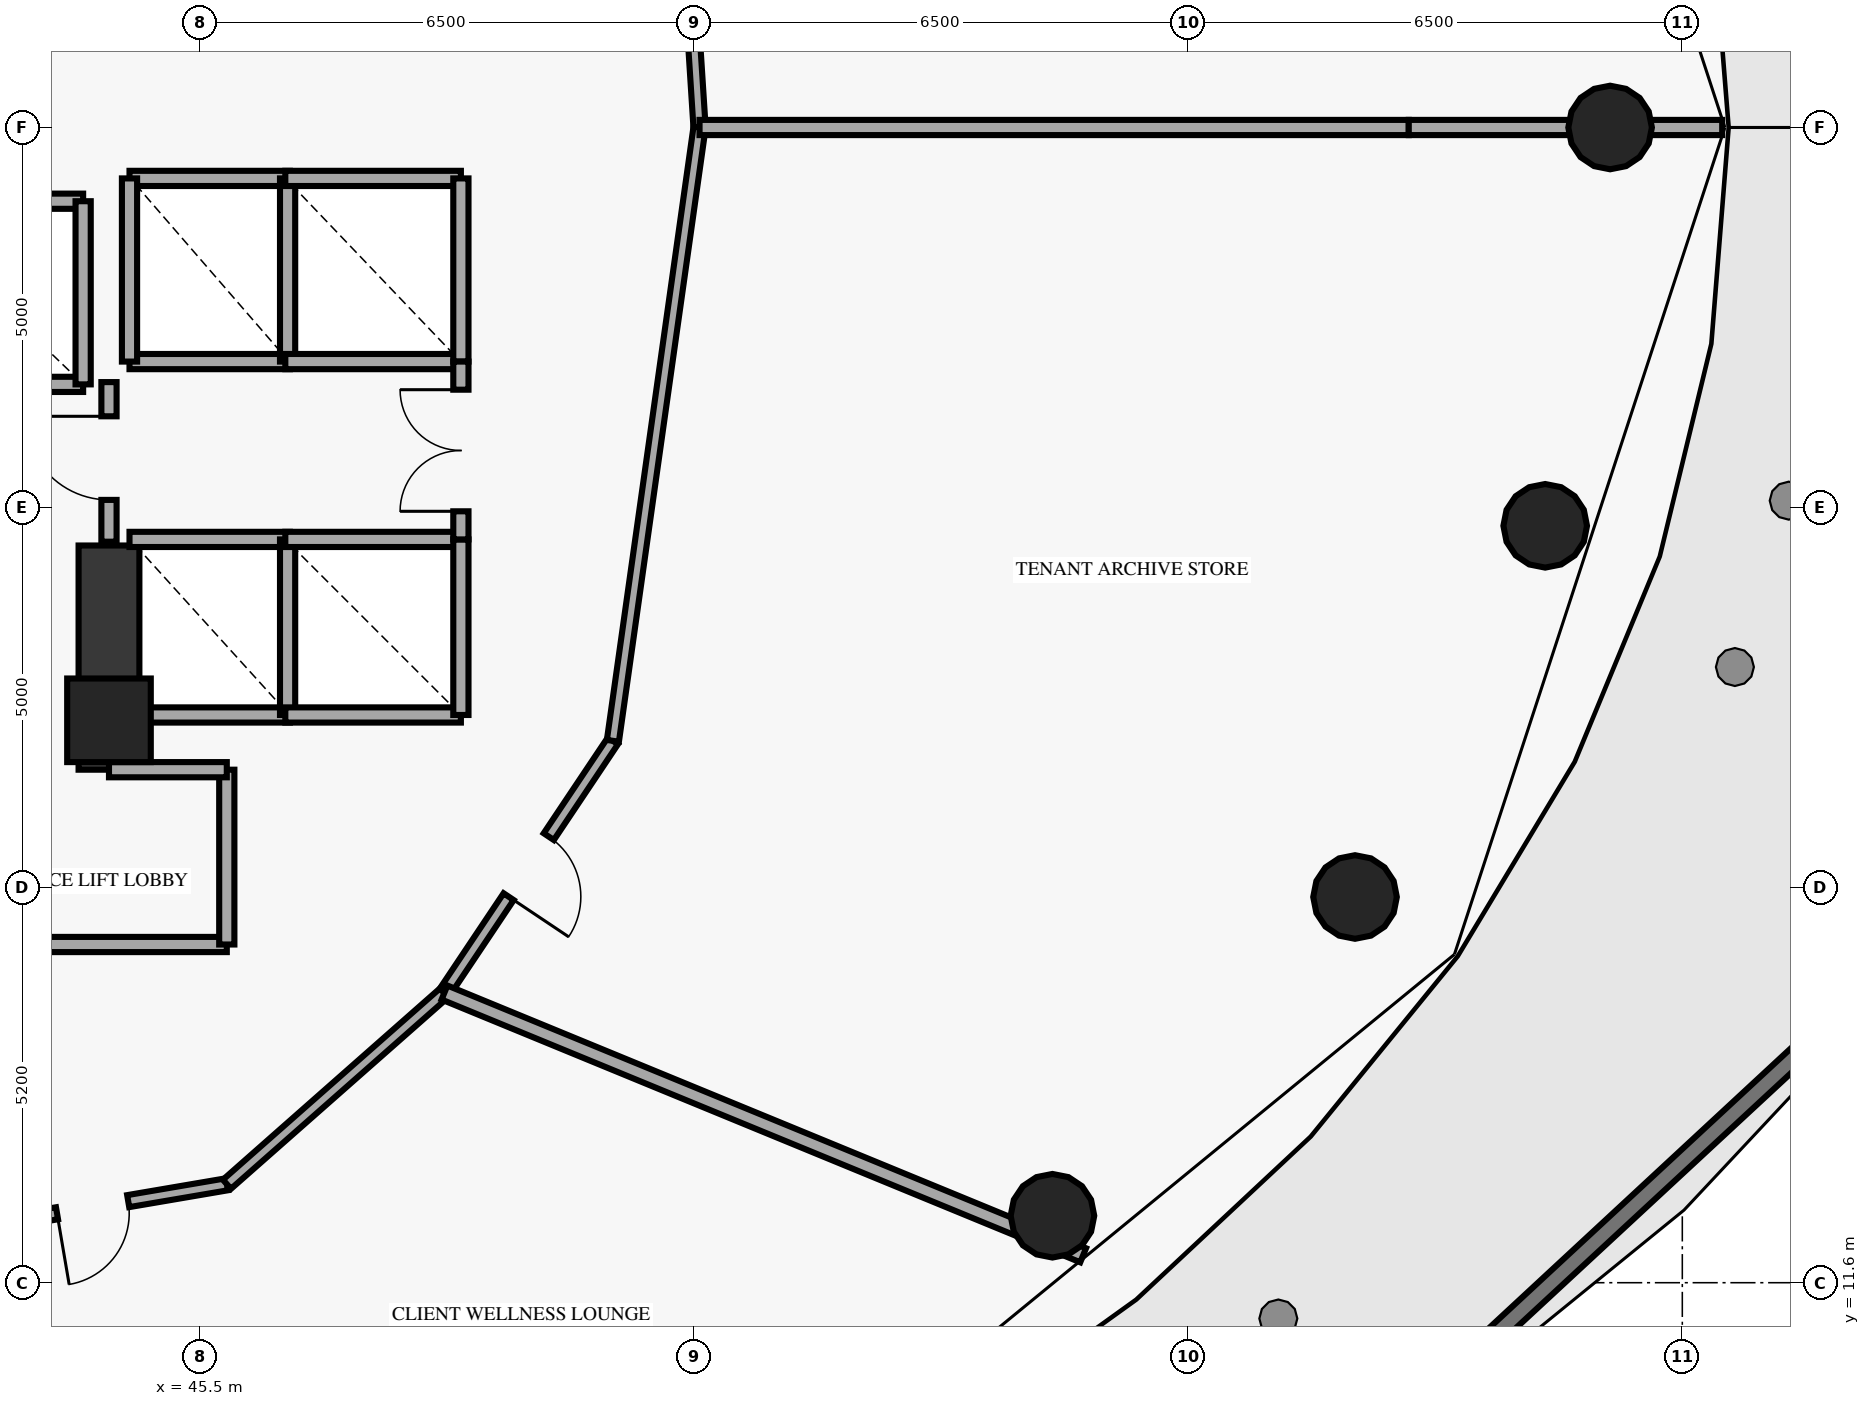
"""IFC4 building model, lengths in metres.
Left out: names, types, materials, properties, quantities, classifications, styles, units other than length and angle.
Written with IfcOpenShell. Run it as: python <this file> out.ifc"""

import sys

from ifc_helpers import new_model, si_unit, direction, frame, frame_2d, origin, origin_2d, place, context, subcontext, project, spatial, rectangle, circle, extrude, element, fill, save


model = new_model("IFC4")
c1 = context("Model", 3, precision=1e-05, world=origin(), true_north=direction((0.0, 1.0)))
c2 = subcontext(c1, "Body", "Model", "MODEL_VIEW")
j1 = project(units=[si_unit("LENGTHUNIT", "METRE"), si_unit("PLANEANGLEUNIT", "RADIAN")], contexts=[c1])
p1 = place(None, origin())
s1 = spatial("IfcSite", under=j1, at=p1, CompositionType="ELEMENT")
p2 = place(p1, origin())
s2 = spatial("IfcBuilding", under=s1, at=p2, CompositionType="ELEMENT")
p3 = place(p2, frame((0.0, 0.0, 21.0)))
s3 = spatial("IfcBuildingStorey", under=s2, at=p3, CompositionType="ELEMENT", Elevation=21.0)
p4 = place(p3, frame((44.3, 19.0, 0.0), z_axis=(0.0, 0.0, 1.0), x_axis=(1.0, 0.0, 0.0)))
e1 = element("IfcColumn", 1, at=p4, inside=s3, PredefinedType="PILASTER", context=c2, shape_type="SweptSolid", body=[
    extrude(rectangle(XDim=1.1, YDim=1.1, at=origin_2d()), origin(), (0.0, 0.0, 1.0), 3.79),
])
for number, where, z_axis, x_axis in (
    (2, (64.05, 26.8, 0.0), (0.0, 0.0, 1.0), (1.0, 0.0, 0.0)),
    (3, (56.713, 12.481, 0.0), (0.0, 0.0, 1.0), (1.0, 0.0, 0.0)),
):
    element("IfcColumn", number, at=place(p3, frame(where, z_axis=z_axis, x_axis=x_axis)), inside=s3, PredefinedType="COLUMN", context=c2, shape_type="SweptSolid", body=[
        extrude(circle(Radius=0.55, at=origin_2d()), origin(), (0.0, 0.0, 1.0), 3.79),
    ])
for number, where, z_axis, x_axis in (
    (4, (60.694, 16.675, -0.26), (0.0, 0.0, 1.0), (1.0, 0.0, 0.0)),
    (5, (63.196, 21.559, -0.26), (0.0, 0.0, 1.0), (1.0, 0.0, 0.0)),
):
    element("IfcColumn", number, at=place(p3, frame(where, z_axis=z_axis, x_axis=x_axis)), inside=s3, PredefinedType="COLUMN", context=c2, shape_type="SweptSolid", body=[
        extrude(circle(Radius=0.55, at=origin_2d()), origin(), (0.0, 0.0, 1.0), 4.05),
    ])
p5 = place(p3, frame((44.3, 18.35, 0.0), z_axis=(0.0, 0.0, 1.0), x_axis=(0.0, 1.0, 0.0)))
e6 = element("IfcWall", 6, at=p5, inside=s3, PredefinedType="SHEAR", context=c2, shape_type="SweptSolid", body=[
    extrude(rectangle(XDim=2.95, YDim=0.8, at=frame_2d((1.475, 0.0))), origin(), (0.0, 0.0, 1.0), 3.79),
])
p6 = place(p3, frame((62.016, 10.43, 0.0), z_axis=(0.0, 0.0, 1.0), x_axis=(0.733372632091, 0.679826876859, 0.0)))
e7 = element("IfcWall", 7, at=p6, inside=s3, PredefinedType="PARAPET", context=c2, shape_type="SweptSolid", body=[
    extrude(rectangle(XDim=7.053, YDim=0.24, at=frame_2d((3.527, 0.0))), origin(), (0.0, 0.0, 1.0), 1.15),
])
for number, where, z_axis, x_axis in (
    (8, (44.57, 23.72, 0.0), (0.0, 0.0, 1.0), (1.0, 0.0, 0.0)),
    (9, (44.57, 26.13, 0.0), (0.0, 0.0, 1.0), (1.0, 0.0, 0.0)),
):
    element("IfcWall", number, at=place(p3, frame(where, z_axis=z_axis, x_axis=x_axis)), inside=s3, PredefinedType="SOLIDWALL", context=c2, shape_type="SweptSolid", body=[
        extrude(rectangle(XDim=2.11, YDim=0.2, at=frame_2d((1.055, 0.0))), origin(), (0.0, 0.0, 1.0), 3.79),
    ])
for number, where, z_axis, x_axis in (
    (10, (44.57, 23.72, 0.0), (0.0, 0.0, 1.0), (0.0, 1.0, 0.0)),
    (11, (46.65, 23.72, 0.0), (0.0, 0.0, 1.0), (0.0, 1.0, 0.0)),
):
    element("IfcWall", number, at=place(p3, frame(where, z_axis=z_axis, x_axis=x_axis)), inside=s3, PredefinedType="SOLIDWALL", context=c2, shape_type="SweptSolid", body=[
        extrude(rectangle(XDim=2.41, YDim=0.2, at=frame_2d((1.205, 0.0))), origin(), (0.0, 0.0, 1.0), 3.79),
    ])
for number, where, z_axis, x_axis in (
    (12, (46.62, 23.72, 0.0), (0.0, 0.0, 1.0), (1.0, 0.0, 0.0)),
    (13, (46.62, 26.13, 0.0), (0.0, 0.0, 1.0), (1.0, 0.0, 0.0)),
):
    element("IfcWall", number, at=place(p3, frame(where, z_axis=z_axis, x_axis=x_axis)), inside=s3, PredefinedType="SOLIDWALL", context=c2, shape_type="SweptSolid", body=[
        extrude(rectangle(XDim=2.31, YDim=0.2, at=frame_2d((1.155, 0.0))), origin(), (0.0, 0.0, 1.0), 3.79),
    ])
p7 = place(p3, frame((48.93, 23.72, 0.0), z_axis=(0.0, 0.0, 1.0), x_axis=(0.0, 1.0, 0.0)))
e14 = element("IfcWall", 14, at=p7, inside=s3, PredefinedType="SOLIDWALL", context=c2, shape_type="SweptSolid", body=[
    extrude(rectangle(XDim=2.41, YDim=0.2, at=frame_2d((1.205, 0.0))), origin(), (0.0, 0.0, 1.0), 3.79),
])
for number, where, z_axis, x_axis in (
    (15, (44.57, 19.07, 0.0), (0.0, 0.0, 1.0), (1.0, 0.0, 0.0)),
    (16, (44.57, 21.38, 0.0), (0.0, 0.0, 1.0), (1.0, 0.0, 0.0)),
):
    element("IfcWall", number, at=place(p3, frame(where, z_axis=z_axis, x_axis=x_axis)), inside=s3, PredefinedType="SOLIDWALL", context=c2, shape_type="SweptSolid", body=[
        extrude(rectangle(XDim=2.11, YDim=0.2, at=frame_2d((1.055, 0.0))), origin(), (0.0, 0.0, 1.0), 3.79),
    ])
for number, where, z_axis, x_axis in (
    (17, (46.65, 19.07, 0.0), (0.0, 0.0, 1.0), (0.0, 1.0, 0.0)),
    (18, (46.62, 19.07, 0.0), (0.0, 0.0, 1.0), (1.0, 0.0, 0.0)),
    (19, (46.62, 21.38, 0.0), (0.0, 0.0, 1.0), (1.0, 0.0, 0.0)),
    (20, (48.93, 19.07, 0.0), (0.0, 0.0, 1.0), (0.0, 1.0, 0.0)),
):
    element("IfcWall", number, at=place(p3, frame(where, z_axis=z_axis, x_axis=x_axis)), inside=s3, PredefinedType="SOLIDWALL", context=c2, shape_type="SweptSolid", body=[
        extrude(rectangle(XDim=2.31, YDim=0.2, at=frame_2d((1.155, 0.0))), origin(), (0.0, 0.0, 1.0), 3.79),
    ])
for number, where, z_axis, x_axis in (
    (21, (41.46, 23.42, 0.0), (0.0, 0.0, 1.0), (1.0, 0.0, 0.0)),
    (22, (41.46, 25.83, 0.0), (0.0, 0.0, 1.0), (1.0, 0.0, 0.0)),
):
    element("IfcWall", number, at=place(p3, frame(where, z_axis=z_axis, x_axis=x_axis)), inside=s3, PredefinedType="SOLIDWALL", context=c2, shape_type="SweptSolid", body=[
        extrude(rectangle(XDim=2.5, YDim=0.2, at=frame_2d((1.25, 0.0))), origin(), (0.0, 0.0, 1.0), 3.79),
    ])
p8 = place(p3, frame((43.96, 23.42, 0.0), z_axis=(0.0, 0.0, 1.0), x_axis=(0.0, 1.0, 0.0)))
e23 = element("IfcWall", 23, at=p8, inside=s3, PredefinedType="SOLIDWALL", context=c2, shape_type="SweptSolid", body=[
    extrude(rectangle(XDim=2.41, YDim=0.2, at=frame_2d((1.205, 0.0))), origin(), (0.0, 0.0, 1.0), 3.79),
])
p9 = place(p3, frame((48.93, 21.38, 0.0), z_axis=(0.0, 0.0, 1.0), x_axis=(0.0, 1.0, 0.0)))
e24 = element("IfcWall", 24, at=p9, inside=s3, PredefinedType="SOLIDWALL", context=c2, shape_type="SweptSolid", body=[
    extrude(rectangle(XDim=2.34, YDim=0.2, at=frame_2d((1.17, 0.0))), origin(), (0.0, 0.0, 1.0), 3.79),
])
p10 = place(p9, frame((0.37, 0.0, 0.0)))
e25 = element("IfcOpeningElement", 25, at=p10, cuts=e24, PredefinedType="OPENING", context=c2, shape_type="SweptSolid", body=[
    extrude(rectangle(XDim=1.6, YDim=2.2, at=frame_2d((0.8, 1.1))), frame((0.0, 0.11, 0.0), z_axis=(0.0, -1.0, 0.0), x_axis=(1.0, 0.0, 0.0)), (0.0, 0.0, 1.0), 0.22),
])
p11 = place(p3, frame((44.3, 21.35, 0.0), z_axis=(0.0, 0.0, 1.0), x_axis=(0.0, 1.0, 0.0)))
e26 = element("IfcWall", 26, at=p11, inside=s3, PredefinedType="SOLIDWALL", context=c2, shape_type="SweptSolid", body=[
    extrude(rectangle(XDim=2.1, YDim=0.2, at=frame_2d((1.05, 0.0))), origin(), (0.0, 0.0, 1.0), 3.01),
])
p12 = place(p11, frame((0.55, 0.0, 0.0)))
e27 = element("IfcOpeningElement", 27, at=p12, cuts=e26, PredefinedType="OPENING", context=c2, shape_type="SweptSolid", body=[
    extrude(rectangle(XDim=1.1, YDim=2.15, at=frame_2d((0.55, 1.075))), frame((0.0, 0.11, 0.0), z_axis=(0.0, -1.0, 0.0), x_axis=(1.0, 0.0, 0.0)), (0.0, 0.0, 1.0), 0.22),
])
p13 = place(p3, frame((41.35, 16.05, 0.0), z_axis=(0.0, 0.0, 1.0), x_axis=(1.0, 0.0, 0.0)))
e28 = element("IfcWall", 28, at=p13, inside=s3, PredefinedType="SOLIDWALL", context=c2, shape_type="SweptSolid", body=[
    extrude(rectangle(XDim=4.5, YDim=0.2, at=frame_2d((2.25, 0.0))), origin(), (0.0, 0.0, 1.0), 3.79),
])
p14 = place(p3, frame((45.85, 16.05, 0.0), z_axis=(0.0, 0.0, 1.0), x_axis=(0.0, 1.0, 0.0)))
e29 = element("IfcWall", 29, at=p14, inside=s3, PredefinedType="SOLIDWALL", context=c2, shape_type="SweptSolid", body=[
    extrude(rectangle(XDim=2.3, YDim=0.2, at=frame_2d((1.15, 0.0))), origin(), (0.0, 0.0, 1.0), 3.79),
])
p15 = place(p3, frame((44.3, 18.35, 0.0), z_axis=(0.0, 0.0, 1.0), x_axis=(1.0, 0.0, 0.0)))
e30 = element("IfcWall", 30, at=p15, inside=s3, PredefinedType="SOLIDWALL", context=c2, shape_type="SweptSolid", body=[
    extrude(rectangle(XDim=1.55, YDim=0.2, at=frame_2d((0.775, 0.0))), origin(), (0.0, 0.0, 1.0), 3.79),
])
p16 = place(p3, frame((51.812, 30.822, 0.0), z_axis=(0.0, 0.0, 1.0), x_axis=(0.064030047677, -0.997947971086, 0.0)))
e31 = element("IfcWall", 31, at=p16, inside=s3, PredefinedType="PARTITIONING", context=c2, shape_type="SweptSolid", body=[
    extrude(rectangle(XDim=4.03, YDim=0.16, at=frame_2d((2.015, 0.0))), origin(), (0.0, 0.0, 1.0), 3.79),
])
p17 = place(p16, frame((1.215, 0.0, 0.0)))
e32 = element("IfcOpeningElement", 32, at=p17, cuts=e31, PredefinedType="OPENING", context=c2, shape_type="SweptSolid", body=[
    extrude(rectangle(XDim=1.6, YDim=2.2, at=frame_2d((0.8, 1.1))), frame((0.0, 0.09, 0.0), z_axis=(0.0, -1.0, 0.0), x_axis=(1.0, 0.0, 0.0)), (0.0, 0.0, 1.0), 0.18),
])
p18 = place(p3, frame((45.852, 12.895, 0.0), z_axis=(0.0, 0.0, 1.0), x_axis=(-0.985751576779, -0.168207695658, 0.0)))
e33 = element("IfcWall", 33, at=p18, inside=s3, PredefinedType="PARTITIONING", context=c2, shape_type="SweptSolid", body=[
    extrude(rectangle(XDim=3.585, YDim=0.16, at=frame_2d((1.792, 0.0))), origin(), (0.0, 0.0, 1.0), 3.79),
])
p19 = place(p18, frame((1.318, 0.0, 0.0)))
e34 = element("IfcOpeningElement", 34, at=p19, cuts=e33, PredefinedType="OPENING", context=c2, shape_type="SweptSolid", body=[
    extrude(rectangle(XDim=0.95, YDim=2.15, at=frame_2d((0.475, 1.075))), frame((0.0, 0.09, 0.0), z_axis=(0.0, -1.0, 0.0), x_axis=(1.0, 0.0, 0.0)), (0.0, 0.0, 1.0), 0.18),
])
p20 = place(p3, frame((45.852, 12.895, 0.0), z_axis=(0.0, 0.0, 1.0), x_axis=(0.75014962781, 0.661268127083, 0.0)))
e35 = element("IfcWall", 35, at=p20, inside=s3, PredefinedType="PARTITIONING", context=c2, shape_type="SweptSolid", body=[
    extrude(rectangle(XDim=3.815, YDim=0.16, at=frame_2d((1.908, 0.0))), origin(), (0.0, 0.0, 1.0), 3.79),
])
p21 = place(p3, frame((50.93, 18.73, 0.0), z_axis=(0.0, 0.0, 1.0), x_axis=(-0.556056751682, -0.831144324958, 0.0)))
e36 = element("IfcWall", 36, at=p21, inside=s3, PredefinedType="PARTITIONING", context=c2, shape_type="SweptSolid", body=[
    extrude(rectangle(XDim=3.985, YDim=0.16, at=frame_2d((1.992, 0.0))), origin(), (0.0, 0.0, 1.0), 3.79),
])
p22 = place(p21, frame((1.517, 0.0, 0.0)))
e37 = element("IfcOpeningElement", 37, at=p22, cuts=e36, PredefinedType="OPENING", context=c2, shape_type="SweptSolid", body=[
    extrude(rectangle(XDim=0.95, YDim=2.15, at=frame_2d((0.475, 1.075))), frame((0.0, 0.09, 0.0), z_axis=(0.0, -1.0, 0.0), x_axis=(1.0, 0.0, 0.0)), (0.0, 0.0, 1.0), 0.18),
])
p23 = place(p3, frame((50.93, 18.73, 0.0), z_axis=(0.0, 0.0, 1.0), x_axis=(0.139890479785, 0.990166982718, 0.0)))
e38 = element("IfcWall", 38, at=p23, inside=s3, PredefinedType="PARTITIONING", context=c2, shape_type="SweptSolid", body=[
    extrude(rectangle(XDim=8.15, YDim=0.16, at=frame_2d((4.075, 0.0))), origin(), (0.0, 0.0, 1.0), 3.79),
])
p24 = place(p3, frame((52.07, 26.8, 0.0), z_axis=(0.0, 0.0, 1.0), x_axis=(1.0, 0.0, 0.0)))
e39 = element("IfcWall", 39, at=p24, inside=s3, PredefinedType="PARTITIONING", context=c2, shape_type="SweptSolid", body=[
    extrude(rectangle(XDim=9.331, YDim=0.2, at=frame_2d((4.666, 0.0))), origin(), (0.0, 0.0, 1.0), 3.79),
])
p25 = place(p3, frame((61.401, 26.8, 0.0), z_axis=(0.0, 0.0, 1.0), x_axis=(1.0, 0.0, 0.0)))
e40 = element("IfcWall", 40, at=p25, inside=s3, PredefinedType="PARTITIONING", context=c2, shape_type="SweptSolid", body=[
    extrude(rectangle(XDim=2.66, YDim=0.2, at=frame_2d((1.33, 0.0))), origin(), (0.0, 0.0, 1.0), 2.78),
])
p26 = place(p3, frame((64.061, 26.8, 0.0), z_axis=(0.0, 0.0, 1.0), x_axis=(1.0, 0.0, 0.0)))
e41 = element("IfcWall", 41, at=p26, inside=s3, PredefinedType="PARTITIONING", context=c2, shape_type="SweptSolid", body=[
    extrude(rectangle(XDim=1.464, YDim=0.2, at=frame_2d((0.732, 0.0))), origin(), (0.0, 0.0, 1.0), 3.79),
])
p27 = place(p3, frame((42.318, 12.292, 0.0), z_axis=(0.0, 0.0, 1.0), x_axis=(0.498565662125, -0.866851936925, 0.0)))
e42 = element("IfcWall", 42, at=p27, inside=s3, PredefinedType="PARTITIONING", context=c2, shape_type="SweptSolid", body=[
    extrude(rectangle(XDim=6.647, YDim=0.2, at=frame_2d((3.323, 0.0))), origin(), (0.0, 0.0, 1.0), 3.79),
])
p28 = place(p3, frame((48.714, 15.418, 0.0), z_axis=(0.0, 0.0, 1.0), x_axis=(0.924792688949, -0.38047139507, 0.0)))
e43 = element("IfcWall", 43, at=p28, inside=s3, PredefinedType="PARTITIONING", context=c2, shape_type="SweptSolid", body=[
    extrude(rectangle(XDim=9.086, YDim=0.2, at=frame_2d((4.543, 0.0))), origin(), (0.0, 0.0, 1.0), 3.79),
])
p29 = place(p10, origin())
e44 = element("IfcDoor", 44, at=p29, inside=s3, OperationType="DOUBLE_DOOR_SINGLE_SWING", PredefinedType="DOOR", context=c2, shape_type="SweptSolid", body=[
    extrude(rectangle(XDim=1.6, YDim=2.2, at=frame_2d((0.8, 1.1))), frame((0.0, 0.025, 0.0), z_axis=(0.0, -1.0, 0.0), x_axis=(1.0, 0.0, 0.0)), (0.0, 0.0, 1.0), 0.05),
])
fill(e25, e44)
p30 = place(p12, origin())
e45 = element("IfcDoor", 45, at=p30, inside=s3, OperationType="SINGLE_SWING_RIGHT", PredefinedType="DOOR", context=c2, shape_type="SweptSolid", body=[
    extrude(rectangle(XDim=1.1, YDim=2.15, at=frame_2d((0.55, 1.075))), frame((0.0, 0.025, 0.0), z_axis=(0.0, -1.0, 0.0), x_axis=(1.0, 0.0, 0.0)), (0.0, 0.0, 1.0), 0.05),
])
fill(e27, e45)
p31 = place(p19, origin())
e46 = element("IfcDoor", 46, at=p31, inside=s3, OperationType="SINGLE_SWING_RIGHT", PredefinedType="DOOR", context=c2, shape_type="SweptSolid", body=[
    extrude(rectangle(XDim=0.95, YDim=2.15, at=frame_2d((0.475, 1.075))), frame((0.0, 0.025, 0.0), z_axis=(0.0, -1.0, 0.0), x_axis=(1.0, 0.0, 0.0)), (0.0, 0.0, 1.0), 0.05),
])
fill(e34, e46)
p32 = place(p22, origin())
e47 = element("IfcDoor", 47, at=p32, inside=s3, OperationType="SINGLE_SWING_RIGHT", PredefinedType="DOOR", context=c2, shape_type="SweptSolid", body=[
    extrude(rectangle(XDim=0.95, YDim=2.15, at=frame_2d((0.475, 1.075))), frame((0.0, 0.025, 0.0), z_axis=(0.0, -1.0, 0.0), x_axis=(1.0, 0.0, 0.0)), (0.0, 0.0, 1.0), 0.05),
])
fill(e37, e47)
save(model, sys.argv[1])
